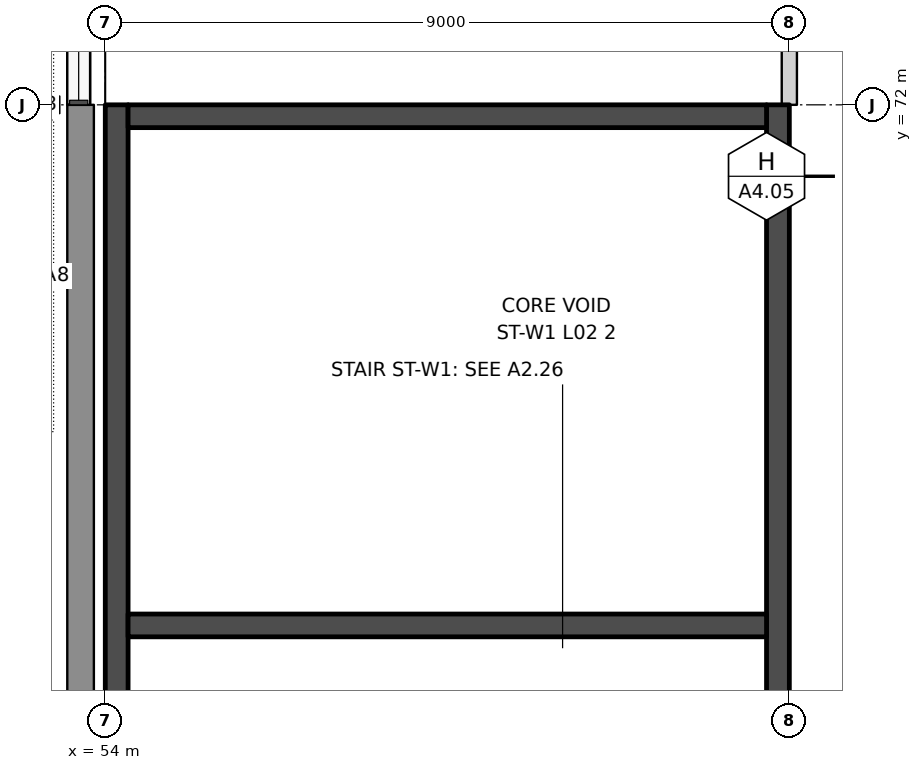
"""IFC4 building model, lengths in metres.
Left out: names, types, materials, properties, quantities, classifications, styles, units other than length and angle.
Written with IfcOpenShell. Run it as: python <this file> out.ifc"""

import sys

from ifc_helpers import new_model, si_unit, direction, frame, frame_2d, origin, place, context, subcontext, project, spatial, rectangle, extrude, element, save


model = new_model("IFC4")
c1 = context("Model", 3, precision=1e-05, world=origin(), true_north=direction((0.0, 1.0)))
c2 = subcontext(c1, "Body", "Model", "MODEL_VIEW")
j1 = project(units=[si_unit("LENGTHUNIT", "METRE"), si_unit("PLANEANGLEUNIT", "RADIAN")], contexts=[c1])
p1 = place(None, origin())
s1 = spatial("IfcSite", under=j1, at=p1, CompositionType="ELEMENT")
p2 = place(p1, origin())
s2 = spatial("IfcBuilding", under=s1, at=p2, CompositionType="ELEMENT")
p3 = place(p2, frame((0.0, 0.0, 11.5)))
s3 = spatial("IfcBuildingStorey", under=s2, at=p3, CompositionType="ELEMENT", Elevation=11.5)
p4 = place(p3, frame((63.0, 72.0, 0.0), z_axis=(0.0, 0.0, 1.0), x_axis=(0.0, 1.0, 0.0)))
e1 = element("IfcWall", 1, at=p4, inside=s3, PredefinedType="PARTITIONING", context=c2, shape_type="SweptSolid", body=[
    extrude(rectangle(XDim=8.6, YDim=0.2, at=frame_2d((4.3, 0.0))), origin(), (0.0, 0.0, 1.0), 9.15),
])
p5 = place(p4, frame((3.8, 0.0, 0.0)))
e2 = element("IfcOpeningElement", 2, at=p5, cuts=e1, PredefinedType="OPENING", context=c2, shape_type="SweptSolid", body=[
    extrude(rectangle(XDim=1.0, YDim=2.1, at=frame_2d((0.5, 1.05))), frame((0.0, 0.11, 0.0), z_axis=(0.0, -1.0, 0.0), x_axis=(1.0, 0.0, 0.0)), (0.0, 0.0, 1.0), 0.22),
])
p6 = place(p3, frame((53.675, 72.0, 0.0), z_axis=(0.0, 0.0, 1.0), x_axis=(0.0, -1.0, 0.0)))
e3 = element("IfcWall", 3, at=p6, inside=s3, PredefinedType="SOLIDWALL", context=c2, shape_type="SweptSolid", body=[
    extrude(rectangle(XDim=9.0, YDim=0.35, at=frame_2d((4.5, 0.0))), origin(), (0.0, 0.0, 1.0), 10.5),
])
p7 = place(p3, frame((53.65, 80.55, 0.0), z_axis=(0.0, 0.0, 1.0), x_axis=(0.0, -1.0, 0.0)))
e4 = element("IfcWall", 4, at=p7, inside=s3, PredefinedType="SOLIDWALL", context=c2, shape_type="SweptSolid", body=[
    extrude(rectangle(XDim=8.55, YDim=0.3, at=frame_2d((4.275, 0.0))), origin(), (0.0, 0.0, 1.0), 1.0),
])
p8 = place(p3, frame((62.85, 54.0, 0.0), z_axis=(0.0, 0.0, 1.0), x_axis=(0.0, 1.0, 0.0)))
e5 = element("IfcWall", 5, at=p8, inside=s3, PredefinedType="SHEAR", context=c2, shape_type="SweptSolid", body=[
    extrude(rectangle(XDim=18.0, YDim=0.3, at=frame_2d((9.0, 0.0))), origin(), (0.0, 0.0, 1.0), 10.5),
])
p9 = place(p8, frame((1.5, 0.0, 0.0)))
e6 = element("IfcOpeningElement", 6, at=p9, cuts=e5, PredefinedType="OPENING", context=c2, shape_type="SweptSolid", body=[
    extrude(rectangle(XDim=1.2, YDim=2.1, at=frame_2d((0.6, 1.05))), frame((0.0, 0.16, 0.0), z_axis=(0.0, -1.0, 0.0), x_axis=(1.0, 0.0, 0.0)), (0.0, 0.0, 1.0), 0.32),
])
p10 = place(p3, frame((54.15, 54.0, 0.0), z_axis=(0.0, 0.0, 1.0), x_axis=(0.0, 1.0, 0.0)))
e7 = element("IfcWall", 7, at=p10, inside=s3, PredefinedType="SHEAR", context=c2, shape_type="SweptSolid", body=[
    extrude(rectangle(XDim=18.0, YDim=0.3, at=frame_2d((9.0, 0.0))), origin(), (0.0, 0.0, 1.0), 10.5),
])
for number, where, z_axis, x_axis in (
    (8, (62.7, 71.85, 0.0), (0.0, 0.0, 1.0), (-1.0, 0.0, 0.0)),
    (9, (62.7, 65.15, 0.0), (0.0, 0.0, 1.0), (-1.0, 0.0, 0.0)),
):
    element("IfcWall", number, at=place(p3, frame(where, z_axis=z_axis, x_axis=x_axis)), inside=s3, PredefinedType="SHEAR", context=c2, shape_type="SweptSolid", body=[
        extrude(rectangle(XDim=8.4, YDim=0.3, at=frame_2d((4.2, 0.0))), origin(), (0.0, 0.0, 1.0), 10.5),
    ])
save(model, sys.argv[1])
